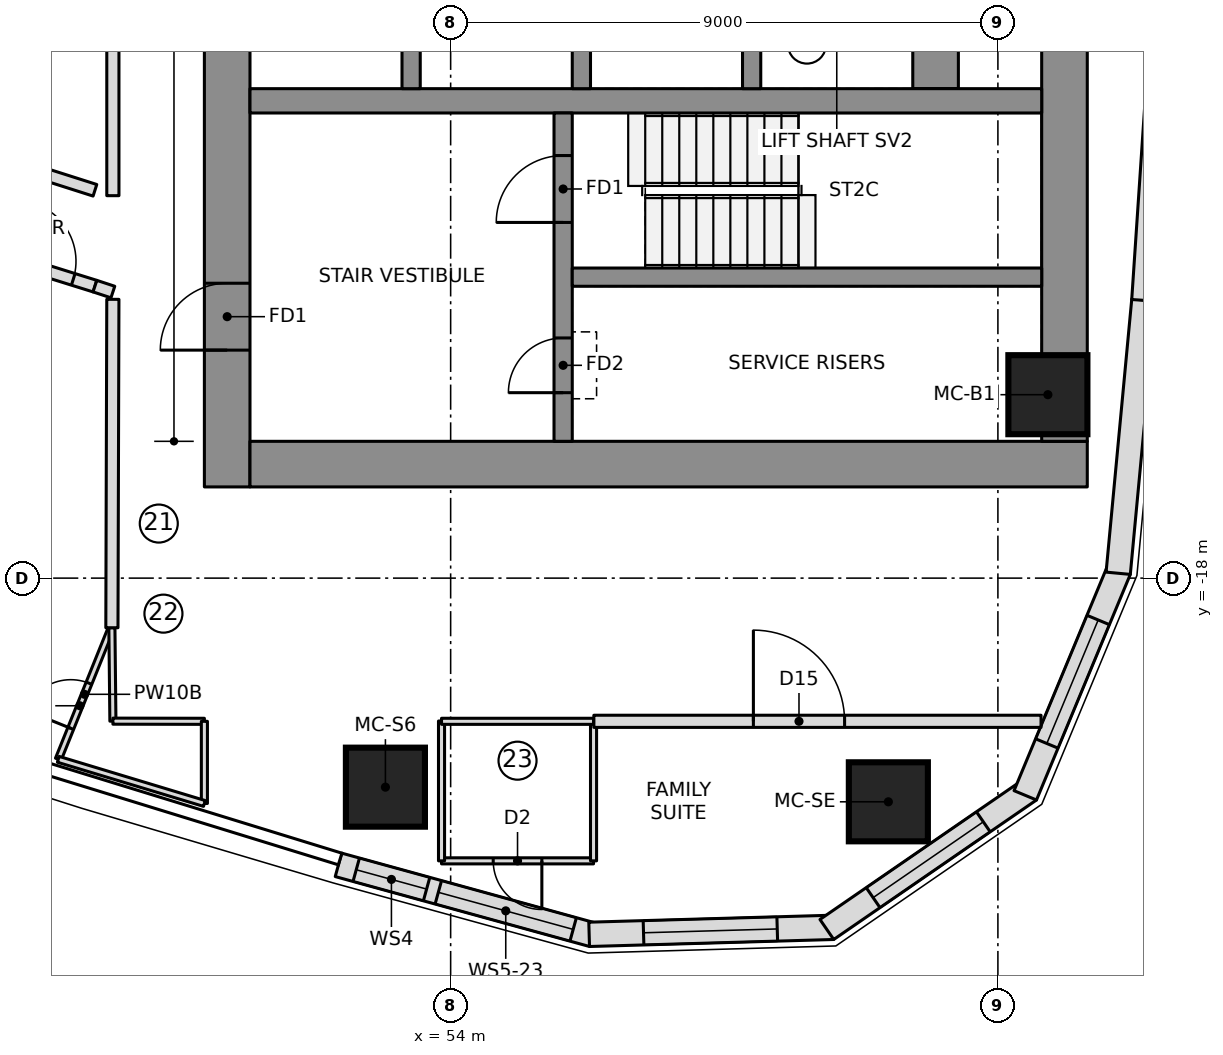
"""IFC4 building model, lengths in metres.
Left out: names, types, materials, properties, quantities, classifications, styles, units other than length and angle.
Written with IfcOpenShell. Run it as: python <this file> out.ifc"""

import sys

from ifc_helpers import new_model, si_unit, direction, frame, frame_2d, origin, origin_2d, place, context, subcontext, project, spatial, polyline, rectangle, outline, extrude, element, fill, save


model = new_model("IFC4")
c1 = context("Model", 3, precision=1e-05, world=origin(), true_north=direction((0.0, 1.0)))
c2 = subcontext(c1, "Body", "Model", "MODEL_VIEW")
j1 = project(units=[si_unit("LENGTHUNIT", "METRE"), si_unit("PLANEANGLEUNIT", "RADIAN")], contexts=[c1])
p1 = place(None, origin())
s1 = spatial("IfcSite", under=j1, at=p1, CompositionType="ELEMENT")
p2 = place(p1, origin())
s2 = spatial("IfcBuilding", under=s1, at=p2, CompositionType="ELEMENT")
p3 = place(p2, frame((0.0, 0.0, 196.8)))
s3 = spatial("IfcBuildingStorey", under=s2, at=p3, CompositionType="ELEMENT", Elevation=196.8)
p4 = place(p3, frame((50.325, -16.5, 0.0), z_axis=(0.0, 0.0, 1.0), x_axis=(0.0, 1.0, 0.0)))
e1 = element("IfcWall", 1, at=p4, inside=s3, PredefinedType="SHEAR", context=c2, shape_type="SweptSolid", body=[
    extrude(rectangle(XDim=9.85, YDim=0.75, at=frame_2d((4.925, 0.0))), origin(), (0.0, 0.0, 1.0), 3.55),
])
p5 = place(p4, frame((2.25, 0.0, 0.0)))
e2 = element("IfcOpeningElement", 2, at=p5, cuts=e1, PredefinedType="OPENING", context=c2, shape_type="SweptSolid", body=[
    extrude(rectangle(XDim=1.1, YDim=2.1, at=frame_2d((0.55, 1.05))), frame((0.0, 0.385, 0.0), z_axis=(0.0, -1.0, 0.0), x_axis=(1.0, 0.0, 0.0)), (0.0, 0.0, 1.0), 0.77),
])
p6 = place(p3, frame((50.7, -16.125, 0.0), z_axis=(0.0, 0.0, 1.0), x_axis=(1.0, 0.0, 0.0)))
e3 = element("IfcWall", 3, at=p6, inside=s3, PredefinedType="SHEAR", context=c2, shape_type="SweptSolid", body=[
    extrude(rectangle(XDim=13.77, YDim=0.75, at=frame_2d((6.885, 0.0))), origin(), (0.0, 0.0, 1.0), 3.55),
])
p7 = place(p3, frame((64.095, -15.75, 0.0), z_axis=(0.0, 0.0, 1.0), x_axis=(0.0, 1.0, 0.0)))
e4 = element("IfcWall", 4, at=p7, inside=s3, PredefinedType="SHEAR", context=c2, shape_type="SweptSolid", body=[
    extrude(rectangle(XDim=7.651, YDim=0.75, at=frame_2d((3.825, 0.0))), origin(), (0.0, 0.0, 1.0), 3.55),
])
p8 = place(p3, frame((61.975, -9.95, 0.0), z_axis=(0.0, 0.0, 1.0), x_axis=(0.0, 1.0, 0.0)))
e5 = element("IfcWall", 5, at=p8, inside=s3, PredefinedType="SHEAR", context=c2, shape_type="SweptSolid", body=[
    extrude(rectangle(XDim=19.9, YDim=0.75, at=frame_2d((9.95, 0.0))), origin(), (0.0, 0.0, 1.0), 3.55),
])
p9 = place(p3, frame((50.7, -10.15, 0.0), z_axis=(0.0, 0.0, 1.0), x_axis=(1.0, 0.0, 0.0)))
e6 = element("IfcWall", 6, at=p9, inside=s3, PredefinedType="SHEAR", context=c2, shape_type="SweptSolid", body=[
    extrude(rectangle(XDim=13.02, YDim=0.4, at=frame_2d((6.51, 0.0))), origin(), (0.0, 0.0, 1.0), 3.55),
])
for number, where, z_axis, x_axis in (
    (7, (53.35, -9.95, 0.0), (0.0, 0.0, 1.0), (0.0, 1.0, 0.0)),
    (8, (56.15, -9.95, 0.0), (0.0, 0.0, 1.0), (0.0, 1.0, 0.0)),
    (9, (58.95, -9.95, 0.0), (0.0, 0.0, 1.0), (0.0, 1.0, 0.0)),
):
    element("IfcWall", number, at=place(p3, frame(where, z_axis=z_axis, x_axis=x_axis)), inside=s3, PredefinedType="SHEAR", context=c2, shape_type="SweptSolid", body=[
        extrude(rectangle(XDim=3.0, YDim=0.3, at=frame_2d((1.5, 0.0))), origin(), (0.0, 0.0, 1.0), 3.55),
    ])
p10 = place(p3, frame((55.85, -15.75, 0.0), z_axis=(0.0, 0.0, 1.0), x_axis=(0.0, 1.0, 0.0)))
e10 = element("IfcWall", 10, at=p10, inside=s3, PredefinedType="SHEAR", context=c2, shape_type="SweptSolid", body=[
    extrude(rectangle(XDim=5.4, YDim=0.3, at=frame_2d((2.7, 0.0))), origin(), (0.0, 0.0, 1.0), 3.55),
])
p11 = place(p10, frame((3.6, 0.0, 0.0)))
e11 = element("IfcOpeningElement", 11, at=p11, cuts=e10, PredefinedType="OPENING", context=c2, shape_type="SweptSolid", body=[
    extrude(rectangle(XDim=1.1, YDim=2.1, at=frame_2d((0.55, 1.05))), frame((0.0, 0.16, 0.0), z_axis=(0.0, -1.0, 0.0), x_axis=(1.0, 0.0, 0.0)), (0.0, 0.0, 1.0), 0.32),
])
p12 = place(p10, frame((0.8, 0.0, 0.0)))
e12 = element("IfcOpeningElement", 12, at=p12, cuts=e10, PredefinedType="OPENING", context=c2, shape_type="SweptSolid", body=[
    extrude(rectangle(XDim=0.9, YDim=2.1, at=frame_2d((0.45, 1.05))), frame((0.0, 0.16, 0.0), z_axis=(0.0, -1.0, 0.0), x_axis=(1.0, 0.0, 0.0)), (0.0, 0.0, 1.0), 0.32),
])
p13 = place(p3, frame((56.0, -13.05, 0.0), z_axis=(0.0, 0.0, 1.0), x_axis=(1.0, 0.0, 0.0)))
e13 = element("IfcWall", 13, at=p13, inside=s3, PredefinedType="SHEAR", context=c2, shape_type="SweptSolid", body=[
    extrude(rectangle(XDim=7.72, YDim=0.3, at=frame_2d((3.86, 0.0))), origin(), (0.0, 0.0, 1.0), 3.55),
])
for number, where, z_axis, x_axis in (
    (14, (52.927, -21.438, 0.0), (0.0, 0.0, 1.0), (1.0, 0.0, 0.0)),
    (15, (61.198, -21.679, 0.0), (0.0, 0.0, 1.0), (1.0, 0.0, 0.0)),
    (16, (63.822, -14.983, 0.0), (0.0, 0.0, 1.0), (1.0, 0.0, 0.0)),
):
    element("IfcColumn", number, at=place(p3, frame(where, z_axis=z_axis, x_axis=x_axis)), inside=s3, PredefinedType="COLUMN", context=c2, shape_type="SweptSolid", body=[
        extrude(rectangle(XDim=1.3, YDim=1.3, at=origin_2d()), origin(), (0.0, 0.0, 1.0), 3.55),
    ])
p14 = place(p3, frame((52.155, -22.716, 0.0), z_axis=(0.0, 0.0, 1.0), x_axis=(0.964205755089, -0.265155165617, 0.0)))
e17 = element("IfcWall", 17, at=p14, inside=s3, PredefinedType="NOTDEFINED", context=c2, shape_type="SweptSolid", body=[
    extrude(outline(polyline([(0.0, -0.2), (4.337, -0.2), (4.277, 0.2), (0.0, 0.2), (0.0, -0.2)])), origin(), (0.0, 0.0, 1.0), 3.25),
])
p15 = place(p14, frame((0.303, 0.0, 0.9)))
e18 = element("IfcOpeningElement", 18, at=p15, cuts=e17, PredefinedType="OPENING", context=c2, shape_type="SweptSolid", body=[
    extrude(rectangle(XDim=1.2, YDim=1.8, at=frame_2d((0.6, 0.9))), frame((0.0, 0.21, 0.0), z_axis=(0.0, -1.0, 0.0), x_axis=(1.0, 0.0, 0.0)), (0.0, 0.0, 1.0), 0.42),
])
p16 = place(p14, frame((1.704, 0.0, 0.9)))
e19 = element("IfcOpeningElement", 19, at=p16, cuts=e17, PredefinedType="OPENING", context=c2, shape_type="SweptSolid", body=[
    extrude(rectangle(XDim=2.3, YDim=1.8, at=frame_2d((1.15, 0.9))), frame((0.0, 0.21, 0.0), z_axis=(0.0, -1.0, 0.0), x_axis=(1.0, 0.0, 0.0)), (0.0, 0.0, 1.0), 0.42),
])
p17 = place(p3, frame((56.308, -23.858, 0.0), z_axis=(0.0, 0.0, 1.0), x_axis=(0.999587920197, 0.028705222472, 0.0)))
e20 = element("IfcWall", 20, at=p17, inside=s3, PredefinedType="NOTDEFINED", context=c2, shape_type="SweptSolid", body=[
    extrude(outline(polyline([(-0.03, -0.2), (3.989, -0.2), (3.87, 0.2), (0.03, 0.2), (-0.03, -0.2)])), origin(), (0.0, 0.0, 1.0), 3.25),
])
p18 = place(p17, frame((0.865, 0.0, 0.6)))
e21 = element("IfcOpeningElement", 21, at=p18, cuts=e20, PredefinedType="OPENING", context=c2, shape_type="SweptSolid", body=[
    extrude(outline(polyline([(0.0, 1.35), (0.084, 1.771), (0.322, 2.128), (0.679, 2.366), (1.1, 2.45), (1.521, 2.366), (1.878, 2.128), (2.116, 1.771), (2.2, 1.35), (2.2, 1.1), (2.116, 0.679), (1.878, 0.322), (1.521, 0.084), (1.1, 0.0), (0.679, 0.084), (0.322, 0.322), (0.084, 0.679), (0.0, 1.1), (0.0, 1.35)])), frame((0.0, 0.21, 0.0), z_axis=(0.0, -1.0, 0.0), x_axis=(1.0, 0.0, 0.0)), (0.0, 0.0, 1.0), 0.42),
])
p19 = place(p3, frame((60.236, -23.745, 0.0), z_axis=(0.0, 0.0, 1.0), x_axis=(0.823806162588, 0.566871596115, 0.0)))
e22 = element("IfcWall", 22, at=p19, inside=s3, PredefinedType="NOTDEFINED", context=c2, shape_type="SweptSolid", body=[
    extrude(outline(polyline([(-0.059, -0.2), (3.988, -0.2), (3.87, 0.2), (0.059, 0.2), (-0.059, -0.2)])), origin(), (0.0, 0.0, 1.0), 3.25),
])
p20 = place(p19, frame((0.865, 0.0, 0.6)))
e23 = element("IfcOpeningElement", 23, at=p20, cuts=e22, PredefinedType="OPENING", context=c2, shape_type="SweptSolid", body=[
    extrude(outline(polyline([(0.0, 1.35), (0.084, 1.771), (0.322, 2.128), (0.679, 2.366), (1.1, 2.45), (1.521, 2.366), (1.878, 2.128), (2.116, 1.771), (2.2, 1.35), (2.2, 1.1), (2.116, 0.679), (1.878, 0.322), (1.521, 0.084), (1.1, 0.0), (0.679, 0.084), (0.322, 0.322), (0.084, 0.679), (0.0, 1.1), (0.0, 1.35)])), frame((0.0, 0.21, 0.0), z_axis=(0.0, -1.0, 0.0), x_axis=(1.0, 0.0, 0.0)), (0.0, 0.0, 1.0), 0.42),
])
p21 = place(p3, frame((63.472, -21.518, 0.0), z_axis=(0.0, 0.0, 1.0), x_axis=(0.383997619794, 0.923334082547, 0.0)))
e24 = element("IfcWall", 24, at=p21, inside=s3, PredefinedType="NOTDEFINED", context=c2, shape_type="SweptSolid", body=[
    extrude(outline(polyline([(-0.059, -0.2), (3.959, -0.2), (3.899, 0.2), (0.059, 0.2), (-0.059, -0.2)])), origin(), (0.0, 0.0, 1.0), 3.25),
])
p22 = place(p21, frame((0.865, 0.0, 0.6)))
e25 = element("IfcOpeningElement", 25, at=p22, cuts=e24, PredefinedType="OPENING", context=c2, shape_type="SweptSolid", body=[
    extrude(outline(polyline([(0.0, 1.35), (0.084, 1.771), (0.322, 2.128), (0.679, 2.366), (1.1, 2.45), (1.521, 2.366), (1.878, 2.128), (2.116, 1.771), (2.2, 1.35), (2.2, 1.1), (2.116, 0.679), (1.878, 0.322), (1.521, 0.084), (1.1, 0.0), (0.679, 0.084), (0.322, 0.322), (0.084, 0.679), (0.0, 1.1), (0.0, 1.35)])), frame((0.0, 0.21, 0.0), z_axis=(0.0, -1.0, 0.0), x_axis=(1.0, 0.0, 0.0)), (0.0, 0.0, 1.0), 0.42),
])
p23 = place(p3, frame((64.981, -17.89, 0.0), z_axis=(0.0, 0.0, 1.0), x_axis=(0.093605694738, 0.995609348044, 0.0)))
e26 = element("IfcWall", 26, at=p23, inside=s3, PredefinedType="NOTDEFINED", context=c2, shape_type="SweptSolid", body=[
    extrude(outline(polyline([(-0.03, -0.2), (4.484, -0.2), (4.478, 0.2), (0.03, 0.2), (-0.03, -0.2)])), origin(), (0.0, 0.0, 1.0), 3.25),
])
p24 = place(p3, frame((65.401, -13.429, 0.0), z_axis=(0.0, 0.0, 1.0), x_axis=(0.066905935948, 0.997759287471, 0.0)))
e27 = element("IfcWall", 27, at=p24, inside=s3, PredefinedType="NOTDEFINED", context=c2, shape_type="SweptSolid", body=[
    extrude(outline(polyline([(-0.003, -0.2), (4.484, -0.2), (4.478, 0.2), (0.003, 0.2), (-0.003, -0.2)])), origin(), (0.0, 0.0, 1.0), 3.25),
])
p25 = place(p3, frame((56.35, -22.65, 0.0), z_axis=(0.0, 0.0, 1.0), x_axis=(-1.0, 0.0, 0.0)))
e28 = element("IfcWall", 28, at=p25, inside=s3, PredefinedType="PARTITIONING", context=c2, shape_type="SweptSolid", body=[
    extrude(rectangle(XDim=2.5, YDim=0.1, at=frame_2d((1.25, 0.0))), origin(), (0.0, 0.0, 1.0), 3.25),
])
p26 = place(p25, frame((0.85, 0.0, 0.0)))
e29 = element("IfcOpeningElement", 29, at=p26, cuts=e28, PredefinedType="OPENING", context=c2, shape_type="SweptSolid", body=[
    extrude(rectangle(XDim=0.8, YDim=2.1, at=frame_2d((0.4, 1.05))), frame((0.0, 0.06, 0.0), z_axis=(0.0, -1.0, 0.0), x_axis=(1.0, 0.0, 0.0)), (0.0, 0.0, 1.0), 0.12),
])
for number, where, z_axis, x_axis in (
    (30, (53.85, -22.65, 0.0), (0.0, 0.0, 1.0), (0.0, 1.0, 0.0)),
    (31, (56.35, -20.35, 0.0), (0.0, 0.0, 1.0), (0.0, -1.0, 0.0)),
):
    element("IfcWall", number, at=place(p3, frame(where, z_axis=z_axis, x_axis=x_axis)), inside=s3, PredefinedType="PARTITIONING", context=c2, shape_type="SweptSolid", body=[
        extrude(rectangle(XDim=2.3, YDim=0.1, at=frame_2d((1.15, 0.0))), origin(), (0.0, 0.0, 1.0), 3.25),
    ])
p27 = place(p3, frame((47.547, -20.98, 0.0), z_axis=(0.0, 0.0, 1.0), x_axis=(0.373908119057, 0.927465750582, 0.0)))
e32 = element("IfcWall", 32, at=p27, inside=s3, PredefinedType="PARTITIONING", context=c2, shape_type="SweptSolid", body=[
    extrude(rectangle(XDim=2.306, YDim=0.1, at=frame_2d((1.153, 0.0))), origin(), (0.0, 0.0, 1.0), 3.25),
])
p28 = place(p27, frame((0.55, 0.0, 0.0)))
e33 = element("IfcOpeningElement", 33, at=p28, cuts=e32, PredefinedType="OPENING", context=c2, shape_type="SweptSolid", body=[
    extrude(rectangle(XDim=0.8, YDim=2.1, at=frame_2d((0.4, 1.05))), frame((0.0, 0.06, 0.0), z_axis=(0.0, -1.0, 0.0), x_axis=(1.0, 0.0, 0.0)), (0.0, 0.0, 1.0), 0.12),
])
p29 = place(p3, frame((56.355, -20.355, 0.0), z_axis=(0.0, 0.0, 1.0), x_axis=(1.0, 0.0, 0.0)))
e34 = element("IfcWall", 34, at=p29, inside=s3, PredefinedType="PARTITIONING", context=c2, shape_type="SweptSolid", body=[
    extrude(rectangle(XDim=7.354, YDim=0.2, at=frame_2d((3.677, 0.0))), origin(), (0.0, 0.0, 1.0), 3.25),
])
p30 = place(p29, frame((2.624, 0.0, 0.0)))
e35 = element("IfcOpeningElement", 35, at=p30, cuts=e34, PredefinedType="OPENING", context=c2, shape_type="SweptSolid", body=[
    extrude(rectangle(XDim=1.5, YDim=2.1, at=frame_2d((0.75, 1.05))), frame((0.0, 0.11, 0.0), z_axis=(0.0, -1.0, 0.0), x_axis=(1.0, 0.0, 0.0)), (0.0, 0.0, 1.0), 0.22),
])
p31 = place(p3, frame((53.85, -20.355, 0.0), z_axis=(0.0, 0.0, 1.0), x_axis=(1.0, 0.0, 0.0)))
e36 = element("IfcWall", 36, at=p31, inside=s3, PredefinedType="PARTITIONING", context=c2, shape_type="SweptSolid", body=[
    extrude(rectangle(XDim=2.5, YDim=0.1, at=frame_2d((1.25, 0.0))), origin(), (0.0, 0.0, 1.0), 3.25),
])
p32 = place(p3, frame((48.429, -18.816, 0.0), z_axis=(0.0, 0.0, 1.0), x_axis=(0.010805026288, -0.999941624, 0.0)))
e37 = element("IfcWall", 37, at=p32, inside=s3, PredefinedType="PARTITIONING", context=c2, shape_type="SweptSolid", body=[
    extrude(rectangle(XDim=1.536, YDim=0.1, at=frame_2d((0.768, 0.0))), origin(), (0.0, 0.0, 1.0), 3.25),
])
p33 = place(p3, frame((48.446, -20.352, 0.0), z_axis=(0.0, 0.0, 1.0), x_axis=(0.999998406651, -0.001785131852, 0.0)))
e38 = element("IfcWall", 38, at=p33, inside=s3, PredefinedType="PARTITIONING", context=c2, shape_type="SweptSolid", body=[
    extrude(rectangle(XDim=1.504, YDim=0.1, at=frame_2d((0.752, 0.0))), origin(), (0.0, 0.0, 1.0), 3.25),
])
p34 = place(p3, frame((49.95, -20.355, 0.0), z_axis=(0.0, 0.0, 1.0), x_axis=(0.0, -1.0, 0.0)))
e39 = element("IfcWall", 39, at=p34, inside=s3, PredefinedType="PARTITIONING", context=c2, shape_type="SweptSolid", body=[
    extrude(rectangle(XDim=1.351, YDim=0.1, at=frame_2d((0.676, 0.0))), origin(), (0.0, 0.0, 1.0), 3.25),
])
p35 = place(p3, frame((49.95, -21.706, 0.0), z_axis=(0.0, 0.0, 1.0), x_axis=(-0.957251518155, 0.289256859885, 0.0)))
e40 = element("IfcWall", 40, at=p35, inside=s3, PredefinedType="PARTITIONING", context=c2, shape_type="SweptSolid", body=[
    extrude(rectangle(XDim=2.51, YDim=0.1, at=frame_2d((1.255, 0.0))), origin(), (0.0, 0.0, 1.0), 3.25),
])
p36 = place(p3, frame((46.17, -12.58, 0.0), z_axis=(0.0, 0.0, 1.0), x_axis=(0.954639063921, -0.297765440634, 0.0)))
e41 = element("IfcWall", 41, at=p36, inside=s3, PredefinedType="PARTITIONING", context=c2, shape_type="SweptSolid", body=[
    extrude(rectangle(XDim=2.073, YDim=0.2, at=frame_2d((1.037, 0.0))), origin(), (0.0, 0.0, 1.0), 3.25),
])
p37 = place(p36, frame((0.7, 0.0, 0.0)))
e42 = element("IfcOpeningElement", 42, at=p37, cuts=e41, PredefinedType="OPENING", context=c2, shape_type="SweptSolid", body=[
    extrude(rectangle(XDim=1.0, YDim=2.1, at=frame_2d((0.5, 1.05))), frame((0.0, 0.11, 0.0), z_axis=(0.0, -1.0, 0.0), x_axis=(1.0, 0.0, 0.0)), (0.0, 0.0, 1.0), 0.22),
])
p38 = place(p3, frame((48.15, -11.621, 0.0), z_axis=(0.0, 0.0, 1.0), x_axis=(-0.952761948983, 0.303718074157, 0.0)))
e43 = element("IfcWall", 43, at=p38, inside=s3, PredefinedType="PARTITIONING", context=c2, shape_type="SweptSolid", body=[
    extrude(rectangle(XDim=1.332, YDim=0.2, at=frame_2d((0.666, 0.0))), origin(), (0.0, 0.0, 1.0), 3.25),
])
p39 = place(p3, frame((48.445, 11.71, 0.0), z_axis=(0.0, 0.0, 1.0), x_axis=(0.0, -1.0, 0.0)))
e44 = element("IfcWall", 44, at=p39, inside=s3, PredefinedType="PARTITIONING", context=c2, shape_type="SweptSolid", body=[
    extrude(rectangle(XDim=23.42, YDim=0.2, at=frame_2d((11.71, 0.0))), origin(), (0.0, 0.0, 1.0), 3.25),
])
p40 = place(p3, frame((48.15, -13.198, 0.0), z_axis=(0.0, 0.0, 1.0), x_axis=(0.949621636458, -0.313398703843, 0.0)))
e45 = element("IfcWall", 45, at=p40, inside=s3, PredefinedType="PARTITIONING", context=c2, shape_type="SweptSolid", body=[
    extrude(rectangle(XDim=0.311, YDim=0.2, at=frame_2d((0.155, 0.0))), origin(), (0.0, 0.0, 1.0), 3.25),
])
p41 = place(p3, frame((48.445, -13.415, 0.0), z_axis=(0.0, 0.0, 1.0), x_axis=(-0.002938106018, -0.999995683757, 0.0)))
e46 = element("IfcWall", 46, at=p41, inside=s3, PredefinedType="PARTITIONING", context=c2, shape_type="SweptSolid", body=[
    extrude(rectangle(XDim=5.401, YDim=0.2, at=frame_2d((2.701, 0.0))), origin(), (0.0, 0.0, 1.0), 3.25),
])
p42 = place(p15, origin())
e47 = element("IfcWindow", 47, at=p42, inside=s3, PartitioningType="SINGLE_PANEL", PredefinedType="WINDOW", context=c2, shape_type="SweptSolid", body=[
    extrude(rectangle(XDim=1.2, YDim=1.8, at=frame_2d((0.6, 0.9))), frame((0.0, 0.17, 0.0), z_axis=(0.0, -1.0, 0.0), x_axis=(1.0, 0.0, 0.0)), (0.0, 0.0, 1.0), 0.06),
])
fill(e18, e47)
p43 = place(p16, origin())
e48 = element("IfcWindow", 48, at=p43, inside=s3, PartitioningType="SINGLE_PANEL", PredefinedType="WINDOW", context=c2, shape_type="SweptSolid", body=[
    extrude(rectangle(XDim=2.3, YDim=1.8, at=frame_2d((1.15, 0.9))), frame((0.0, 0.17, 0.0), z_axis=(0.0, -1.0, 0.0), x_axis=(1.0, 0.0, 0.0)), (0.0, 0.0, 1.0), 0.06),
])
fill(e19, e48)
p44 = place(p18, origin())
e49 = element("IfcWindow", 49, at=p44, inside=s3, PartitioningType="SINGLE_PANEL", PredefinedType="WINDOW", context=c2, shape_type="SweptSolid", body=[
    extrude(outline(polyline([(0.0, 1.35), (0.084, 1.771), (0.322, 2.128), (0.679, 2.366), (1.1, 2.45), (1.521, 2.366), (1.878, 2.128), (2.116, 1.771), (2.2, 1.35), (2.2, 1.1), (2.116, 0.679), (1.878, 0.322), (1.521, 0.084), (1.1, 0.0), (0.679, 0.084), (0.322, 0.322), (0.084, 0.679), (0.0, 1.1), (0.0, 1.35)])), frame((0.0, 0.17, 0.0), z_axis=(0.0, -1.0, 0.0), x_axis=(1.0, 0.0, 0.0)), (0.0, 0.0, 1.0), 0.06),
])
fill(e21, e49)
p45 = place(p20, origin())
e50 = element("IfcWindow", 50, at=p45, inside=s3, PartitioningType="SINGLE_PANEL", PredefinedType="WINDOW", context=c2, shape_type="SweptSolid", body=[
    extrude(outline(polyline([(0.0, 1.35), (0.084, 1.771), (0.322, 2.128), (0.679, 2.366), (1.1, 2.45), (1.521, 2.366), (1.878, 2.128), (2.116, 1.771), (2.2, 1.35), (2.2, 1.1), (2.116, 0.679), (1.878, 0.322), (1.521, 0.084), (1.1, 0.0), (0.679, 0.084), (0.322, 0.322), (0.084, 0.679), (0.0, 1.1), (0.0, 1.35)])), frame((0.0, 0.17, 0.0), z_axis=(0.0, -1.0, 0.0), x_axis=(1.0, 0.0, 0.0)), (0.0, 0.0, 1.0), 0.06),
])
fill(e23, e50)
p46 = place(p22, origin())
e51 = element("IfcWindow", 51, at=p46, inside=s3, PartitioningType="SINGLE_PANEL", PredefinedType="WINDOW", context=c2, shape_type="SweptSolid", body=[
    extrude(outline(polyline([(0.0, 1.35), (0.084, 1.771), (0.322, 2.128), (0.679, 2.366), (1.1, 2.45), (1.521, 2.366), (1.878, 2.128), (2.116, 1.771), (2.2, 1.35), (2.2, 1.1), (2.116, 0.679), (1.878, 0.322), (1.521, 0.084), (1.1, 0.0), (0.679, 0.084), (0.322, 0.322), (0.084, 0.679), (0.0, 1.1), (0.0, 1.35)])), frame((0.0, 0.17, 0.0), z_axis=(0.0, -1.0, 0.0), x_axis=(1.0, 0.0, 0.0)), (0.0, 0.0, 1.0), 0.06),
])
fill(e25, e51)
p47 = place(p26, origin())
e52 = element("IfcDoor", 52, at=p47, inside=s3, OperationType="SINGLE_SWING_LEFT", PredefinedType="DOOR", context=c2, shape_type="SweptSolid", body=[
    extrude(rectangle(XDim=0.8, YDim=2.1, at=frame_2d((0.4, 1.05))), frame((0.0, 0.025, 0.0), z_axis=(0.0, -1.0, 0.0), x_axis=(1.0, 0.0, 0.0)), (0.0, 0.0, 1.0), 0.05),
])
fill(e29, e52)
p48 = place(p28, origin())
e53 = element("IfcDoor", 53, at=p48, inside=s3, OperationType="SINGLE_SWING_LEFT", PredefinedType="DOOR", context=c2, shape_type="SweptSolid", body=[
    extrude(rectangle(XDim=0.8, YDim=2.1, at=frame_2d((0.4, 1.05))), frame((0.0, 0.025, 0.0), z_axis=(0.0, -1.0, 0.0), x_axis=(1.0, 0.0, 0.0)), (0.0, 0.0, 1.0), 0.05),
])
fill(e33, e53)
p49 = place(p37, origin())
e54 = element("IfcDoor", 54, at=p49, inside=s3, OperationType="SINGLE_SWING_RIGHT", PredefinedType="DOOR", context=c2, shape_type="SweptSolid", body=[
    extrude(rectangle(XDim=1.0, YDim=2.1, at=frame_2d((0.5, 1.05))), frame((0.0, 0.025, 0.0), z_axis=(0.0, -1.0, 0.0), x_axis=(1.0, 0.0, 0.0)), (0.0, 0.0, 1.0), 0.05),
])
fill(e42, e54)
p50 = place(p30, origin())
e55 = element("IfcDoor", 55, at=p50, inside=s3, OperationType="DOUBLE_DOOR_SINGLE_SWING", PredefinedType="DOOR", context=c2, shape_type="SweptSolid", body=[
    extrude(rectangle(XDim=1.5, YDim=2.1, at=frame_2d((0.75, 1.05))), frame((0.0, 0.025, 0.0), z_axis=(0.0, -1.0, 0.0), x_axis=(1.0, 0.0, 0.0)), (0.0, 0.0, 1.0), 0.05),
])
fill(e35, e55)
p51 = place(p11, origin())
e56 = element("IfcDoor", 56, at=p51, inside=s3, OperationType="SINGLE_SWING_RIGHT", PredefinedType="DOOR", context=c2, shape_type="SweptSolid", body=[
    extrude(rectangle(XDim=1.1, YDim=2.1, at=frame_2d((0.55, 1.05))), frame((0.0, 0.025, 0.0), z_axis=(0.0, -1.0, 0.0), x_axis=(1.0, 0.0, 0.0)), (0.0, 0.0, 1.0), 0.05),
])
fill(e11, e56)
p52 = place(p5, origin())
e57 = element("IfcDoor", 57, at=p52, inside=s3, OperationType="SINGLE_SWING_RIGHT", PredefinedType="DOOR", context=c2, shape_type="SweptSolid", body=[
    extrude(rectangle(XDim=1.1, YDim=2.1, at=frame_2d((0.55, 1.05))), frame((0.0, 0.025, 0.0), z_axis=(0.0, -1.0, 0.0), x_axis=(1.0, 0.0, 0.0)), (0.0, 0.0, 1.0), 0.05),
])
fill(e2, e57)
p53 = place(p12, origin())
e58 = element("IfcDoor", 58, at=p53, inside=s3, OperationType="SINGLE_SWING_LEFT", PredefinedType="DOOR", context=c2, shape_type="SweptSolid", body=[
    extrude(rectangle(XDim=0.9, YDim=2.1, at=frame_2d((0.45, 1.05))), frame((0.0, 0.025, 0.0), z_axis=(0.0, -1.0, 0.0), x_axis=(1.0, 0.0, 0.0)), (0.0, 0.0, 1.0), 0.05),
])
fill(e12, e58)
save(model, sys.argv[1])
